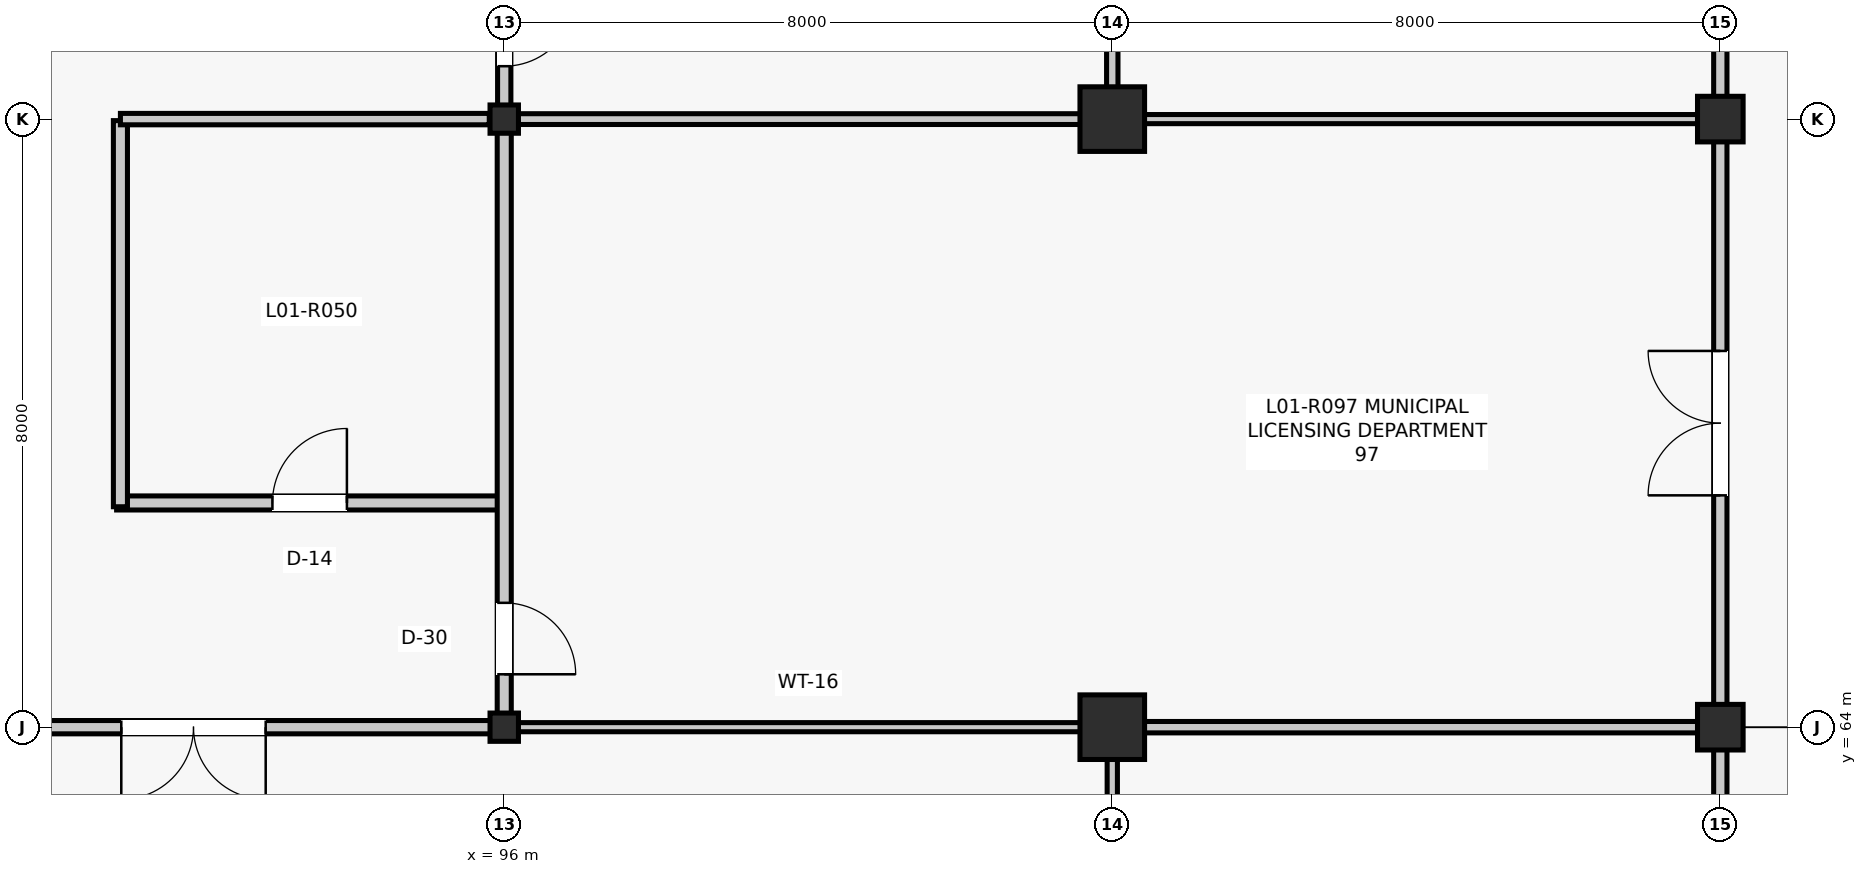
"""IFC4 building model, lengths in metres.
Left out: names, types, materials, properties, quantities, classifications, styles, units other than length and angle.
Written with IfcOpenShell. Run it as: python <this file> out.ifc"""

import sys

from ifc_helpers import new_model, si_unit, direction, frame, frame_2d, origin, origin_2d, place, context, subcontext, project, spatial, rectangle, i_section, extrude, element, fill, save


model = new_model("IFC4")
c1 = context("Model", 3, precision=1e-05, world=origin(), true_north=direction((0.0, 1.0)))
c2 = subcontext(c1, "Body", "Model", "MODEL_VIEW")
j1 = project(units=[si_unit("LENGTHUNIT", "METRE"), si_unit("PLANEANGLEUNIT", "RADIAN")], contexts=[c1])
p1 = place(None, origin())
s1 = spatial("IfcSite", under=j1, at=p1, CompositionType="ELEMENT")
p2 = place(p1, origin())
s2 = spatial("IfcBuilding", under=s1, at=p2, CompositionType="ELEMENT")
p3 = place(p2, frame((0.0, 0.0, 5.28)))
s3 = spatial("IfcBuildingStorey", under=s2, at=p3, CompositionType="ELEMENT", Elevation=5.28)
for number, where, z_axis, x_axis in (
    (1, (96.0, 64.0, 0.0), (0.0, 0.0, 1.0), (1.0, 0.0, 0.0)),
    (2, (96.0, 72.0, 0.0), (0.0, 0.0, 1.0), (1.0, 0.0, 0.0)),
):
    element("IfcColumn", number, at=place(p3, frame(where, z_axis=z_axis, x_axis=x_axis)), inside=s3, PredefinedType="COLUMN", context=c2, shape_type="SweptSolid", body=[
        extrude(i_section(OverallWidth=0.374, OverallDepth=0.372, WebThickness=0.016, FlangeThickness=0.026, FilletRadius=0.015, at=origin_2d()), origin(), (0.0, 0.0, 1.0), 4.62),
    ])
for number, where, z_axis, x_axis in (
    (3, (104.0, 64.0, 0.0), (0.0, 0.0, 1.0), (1.0, 0.0, 0.0)),
    (4, (104.0, 72.0, 0.0), (0.0, 0.0, 1.0), (1.0, 0.0, 0.0)),
):
    element("IfcColumn", number, at=place(p3, frame(where, z_axis=z_axis, x_axis=x_axis)), inside=s3, PredefinedType="COLUMN", context=c2, shape_type="SweptSolid", body=[
        extrude(rectangle(XDim=0.85, YDim=0.85, at=origin_2d()), origin(), (0.0, 0.0, 1.0), 4.62),
    ])
for number, where, z_axis, x_axis in (
    (5, (112.0, 64.0, 0.0), (0.0, 0.0, 1.0), (1.0, 0.0, 0.0)),
    (6, (112.0, 72.0, 0.0), (0.0, 0.0, 1.0), (1.0, 0.0, 0.0)),
):
    element("IfcColumn", number, at=place(p3, frame(where, z_axis=z_axis, x_axis=x_axis)), inside=s3, PredefinedType="COLUMN", context=c2, shape_type="SweptSolid", body=[
        extrude(rectangle(XDim=0.6, YDim=0.6, at=origin_2d()), origin(), (0.0, 0.0, 1.0), 4.62),
    ])
p4 = place(p3, frame((90.9, 66.95, 0.0), z_axis=(0.0, 0.0, 1.0), x_axis=(1.0, 0.0, 0.0)))
e7 = element("IfcWall", 7, at=p4, inside=s3, PredefinedType="PARTITIONING", context=c2, shape_type="SweptSolid", body=[
    extrude(rectangle(XDim=5.08, YDim=0.185, at=frame_2d((2.54, 0.0))), origin(), (0.0, 0.0, 1.0), 3.787),
])
p5 = place(p4, frame((2.05, 0.0, 0.0)))
e8 = element("IfcOpeningElement", 8, at=p5, cuts=e7, PredefinedType="OPENING", context=c2, shape_type="SweptSolid", body=[
    extrude(rectangle(XDim=0.98, YDim=2.15, at=frame_2d((0.49, 1.075))), frame((0.0, 0.103, 0.0), z_axis=(0.0, -1.0, 0.0), x_axis=(1.0, 0.0, 0.0)), (0.0, 0.0, 1.0), 0.205),
])
p6 = place(p3, frame((90.95, 66.9, 0.0), z_axis=(0.0, 0.0, 1.0), x_axis=(0.0, 1.0, 0.0)))
e9 = element("IfcWall", 9, at=p6, inside=s3, PredefinedType="PARTITIONING", context=c2, shape_type="SweptSolid", body=[
    extrude(rectangle(XDim=5.08, YDim=0.185, at=frame_2d((2.54, 0.0))), origin(), (0.0, 0.0, 1.0), 3.397),
])
p7 = place(p3, frame((90.95, 72.0, 0.0), z_axis=(0.0, 0.0, 1.0), x_axis=(1.0, 0.0, 0.0)))
e10 = element("IfcWall", 10, at=p7, inside=s3, PredefinedType="PARTITIONING", context=c2, shape_type="SweptSolid", body=[
    extrude(rectangle(XDim=4.853, YDim=0.15, at=frame_2d((2.427, 0.0))), origin(), (0.0, 0.0, 1.0), 3.397),
])
p8 = place(p3, frame((88.0, 64.0, 0.0), z_axis=(0.0, 0.0, 1.0), x_axis=(1.0, 0.0, 0.0)))
e11 = element("IfcWall", 11, at=p8, inside=s3, PredefinedType="PARTITIONING", context=c2, shape_type="SweptSolid", body=[
    extrude(rectangle(XDim=7.823, YDim=0.175, at=frame_2d((3.912, 0.0))), origin(), (0.0, 0.0, 1.0), 3.562),
])
p9 = place(p8, frame((2.961, 0.0, 0.0)))
e12 = element("IfcOpeningElement", 12, at=p9, cuts=e11, PredefinedType="OPENING", context=c2, shape_type="SweptSolid", body=[
    extrude(rectangle(XDim=1.9, YDim=2.38, at=frame_2d((0.95, 1.19))), frame((0.0, 0.097, 0.0), z_axis=(0.0, -1.0, 0.0), x_axis=(1.0, 0.0, 0.0)), (0.0, 0.0, 1.0), 0.195),
])
p10 = place(p3, frame((96.0, 64.176, 0.0), z_axis=(0.0, 0.0, 1.0), x_axis=(0.0, 1.0, 0.0)))
e13 = element("IfcWall", 13, at=p10, inside=s3, PredefinedType="PARTITIONING", context=c2, shape_type="SweptSolid", body=[
    extrude(rectangle(XDim=7.648, YDim=0.185, at=frame_2d((3.824, 0.0))), origin(), (0.0, 0.0, 1.0), 3.787),
])
p11 = place(p10, frame((0.52, 0.0, 0.0)))
e14 = element("IfcOpeningElement", 14, at=p11, cuts=e13, PredefinedType="OPENING", context=c2, shape_type="SweptSolid", body=[
    extrude(rectangle(XDim=0.94, YDim=2.12, at=frame_2d((0.47, 1.06))), frame((0.0, 0.103, 0.0), z_axis=(0.0, -1.0, 0.0), x_axis=(1.0, 0.0, 0.0)), (0.0, 0.0, 1.0), 0.205),
])
p12 = place(p3, frame((96.0, 72.176, 0.0), z_axis=(0.0, 0.0, 1.0), x_axis=(0.0, 1.0, 0.0)))
e15 = element("IfcWall", 15, at=p12, inside=s3, PredefinedType="PARTITIONING", context=c2, shape_type="SweptSolid", body=[
    extrude(rectangle(XDim=7.648, YDim=0.175, at=frame_2d((3.824, 0.0))), origin(), (0.0, 0.0, 1.0), 3.857),
])
p13 = place(p12, frame((0.52, 0.0, 0.0)))
e16 = element("IfcOpeningElement", 16, at=p13, cuts=e15, PredefinedType="OPENING", context=c2, shape_type="SweptSolid", body=[
    extrude(rectangle(XDim=0.94, YDim=2.12, at=frame_2d((0.47, 1.06))), frame((0.0, 0.097, 0.0), z_axis=(0.0, -1.0, 0.0), x_axis=(1.0, 0.0, 0.0)), (0.0, 0.0, 1.0), 0.195),
])
p14 = place(p3, frame((104.0, 56.415, 0.0), z_axis=(0.0, 0.0, 1.0), x_axis=(0.0, 1.0, 0.0)))
e17 = element("IfcWall", 17, at=p14, inside=s3, PredefinedType="PARTITIONING", context=c2, shape_type="SweptSolid", body=[
    extrude(rectangle(XDim=7.17, YDim=0.135, at=frame_2d((3.585, 0.0))), origin(), (0.0, 0.0, 1.0), 3.787),
])
p15 = place(p3, frame((96.177, 64.0, 0.0), z_axis=(0.0, 0.0, 1.0), x_axis=(1.0, 0.0, 0.0)))
e18 = element("IfcWall", 18, at=p15, inside=s3, PredefinedType="PARTITIONING", context=c2, shape_type="SweptSolid", body=[
    extrude(rectangle(XDim=7.408, YDim=0.12, at=frame_2d((3.704, 0.0))), origin(), (0.0, 0.0, 1.0), 3.712),
])
p16 = place(p3, frame((96.177, 72.0, 0.0), z_axis=(0.0, 0.0, 1.0), x_axis=(1.0, 0.0, 0.0)))
e19 = element("IfcWall", 19, at=p16, inside=s3, PredefinedType="PARTITIONING", context=c2, shape_type="SweptSolid", body=[
    extrude(rectangle(XDim=7.408, YDim=0.142, at=frame_2d((3.704, 0.0))), origin(), (0.0, 0.0, 1.0), 3.787),
])
p17 = place(p3, frame((104.0, 72.415, 0.0), z_axis=(0.0, 0.0, 1.0), x_axis=(0.0, 1.0, 0.0)))
e20 = element("IfcWall", 20, at=p17, inside=s3, PredefinedType="PARTITIONING", context=c2, shape_type="SweptSolid", body=[
    extrude(rectangle(XDim=7.17, YDim=0.15, at=frame_2d((3.585, 0.0))), origin(), (0.0, 0.0, 1.0), 3.781),
])
p18 = place(p3, frame((112.0, 56.39, 0.0), z_axis=(0.0, 0.0, 1.0), x_axis=(0.0, 1.0, 0.0)))
e21 = element("IfcWall", 21, at=p18, inside=s3, PredefinedType="PARTITIONING", context=c2, shape_type="SweptSolid", body=[
    extrude(rectangle(XDim=7.32, YDim=0.175, at=frame_2d((3.66, 0.0))), origin(), (0.0, 0.0, 1.0), 3.857),
])
p19 = place(p18, frame((3.1, 0.0, 0.0)))
e22 = element("IfcOpeningElement", 22, at=p19, cuts=e21, PredefinedType="OPENING", context=c2, shape_type="SweptSolid", body=[
    extrude(rectangle(XDim=1.12, YDim=2.22, at=frame_2d((0.56, 1.11))), frame((0.0, 0.097, 0.0), z_axis=(0.0, -1.0, 0.0), x_axis=(1.0, 0.0, 0.0)), (0.0, 0.0, 1.0), 0.195),
])
p20 = place(p3, frame((104.415, 64.0, 0.0), z_axis=(0.0, 0.0, 1.0), x_axis=(1.0, 0.0, 0.0)))
e23 = element("IfcWall", 23, at=p20, inside=s3, PredefinedType="PARTITIONING", context=c2, shape_type="SweptSolid", body=[
    extrude(rectangle(XDim=7.295, YDim=0.15, at=frame_2d((3.647, 0.0))), origin(), (0.0, 0.0, 1.0), 3.787),
])
p21 = place(p3, frame((112.0, 64.29, 0.0), z_axis=(0.0, 0.0, 1.0), x_axis=(0.0, 1.0, 0.0)))
e24 = element("IfcWall", 24, at=p21, inside=s3, PredefinedType="PARTITIONING", context=c2, shape_type="SweptSolid", body=[
    extrude(rectangle(XDim=7.42, YDim=0.175, at=frame_2d((3.71, 0.0))), origin(), (0.0, 0.0, 1.0), 3.781),
])
p22 = place(p21, frame((2.76, 0.0, 0.0)))
e25 = element("IfcOpeningElement", 25, at=p22, cuts=e24, PredefinedType="OPENING", context=c2, shape_type="SweptSolid", body=[
    extrude(rectangle(XDim=1.9, YDim=2.38, at=frame_2d((0.95, 1.19))), frame((0.0, 0.097, 0.0), z_axis=(0.0, -1.0, 0.0), x_axis=(1.0, 0.0, 0.0)), (0.0, 0.0, 1.0), 0.195),
])
p23 = place(p3, frame((104.415, 72.0, 0.0), z_axis=(0.0, 0.0, 1.0), x_axis=(1.0, 0.0, 0.0)))
e26 = element("IfcWall", 26, at=p23, inside=s3, PredefinedType="PARTITIONING", context=c2, shape_type="SweptSolid", body=[
    extrude(rectangle(XDim=7.295, YDim=0.12, at=frame_2d((3.647, 0.0))), origin(), (0.0, 0.0, 1.0), 3.771),
])
p24 = place(p3, frame((112.0, 72.29, 0.0), z_axis=(0.0, 0.0, 1.0), x_axis=(0.0, 1.0, 0.0)))
e27 = element("IfcWall", 27, at=p24, inside=s3, PredefinedType="PARTITIONING", context=c2, shape_type="SweptSolid", body=[
    extrude(rectangle(XDim=7.42, YDim=0.175, at=frame_2d((3.71, 0.0))), origin(), (0.0, 0.0, 1.0), 3.851),
])
p25 = place(p24, frame((1.355, 0.0, 0.0)))
e28 = element("IfcOpeningElement", 28, at=p25, cuts=e27, PredefinedType="OPENING", context=c2, shape_type="SweptSolid", body=[
    extrude(rectangle(XDim=1.0, YDim=2.15, at=frame_2d((0.5, 1.075))), frame((0.0, 0.097, 0.0), z_axis=(0.0, -1.0, 0.0), x_axis=(1.0, 0.0, 0.0)), (0.0, 0.0, 1.0), 0.195),
])
p26 = place(p24, frame((5.436, 0.0, 0.0)))
e29 = element("IfcOpeningElement", 29, at=p26, cuts=e27, PredefinedType="OPENING", context=c2, shape_type="SweptSolid", body=[
    extrude(rectangle(XDim=1.0, YDim=2.15, at=frame_2d((0.5, 1.075))), frame((0.0, 0.097, 0.0), z_axis=(0.0, -1.0, 0.0), x_axis=(1.0, 0.0, 0.0)), (0.0, 0.0, 1.0), 0.195),
])
p27 = place(p5, origin())
e30 = element("IfcDoor", 30, at=p27, inside=s3, OperationType="SINGLE_SWING_RIGHT", PredefinedType="DOOR", context=c2, shape_type="SweptSolid", body=[
    extrude(rectangle(XDim=0.98, YDim=2.15, at=frame_2d((0.49, 1.075))), frame((0.0, 0.025, 0.0), z_axis=(0.0, -1.0, 0.0), x_axis=(1.0, 0.0, 0.0)), (0.0, 0.0, 1.0), 0.05),
])
fill(e8, e30)
p28 = place(p9, frame((1.9, 0.0, 0.0), z_axis=(0.0, 0.0, 1.0), x_axis=(-1.0, 0.0, 0.0)))
e31 = element("IfcDoor", 31, at=p28, inside=s3, OperationType="DOUBLE_DOOR_SINGLE_SWING", PredefinedType="DOOR", context=c2, shape_type="SweptSolid", body=[
    extrude(rectangle(XDim=1.9, YDim=2.38, at=frame_2d((0.95, 1.19))), frame((0.0, 0.025, 0.0), z_axis=(0.0, -1.0, 0.0), x_axis=(1.0, 0.0, 0.0)), (0.0, 0.0, 1.0), 0.05),
])
fill(e12, e31)
p29 = place(p11, frame((0.94, 0.0, 0.0), z_axis=(0.0, 0.0, 1.0), x_axis=(-1.0, 0.0, 0.0)))
e32 = element("IfcDoor", 32, at=p29, inside=s3, OperationType="SINGLE_SWING_LEFT", PredefinedType="DOOR", context=c2, shape_type="SweptSolid", body=[
    extrude(rectangle(XDim=0.94, YDim=2.12, at=frame_2d((0.47, 1.06))), frame((0.0, 0.025, 0.0), z_axis=(0.0, -1.0, 0.0), x_axis=(1.0, 0.0, 0.0)), (0.0, 0.0, 1.0), 0.05),
])
fill(e14, e32)
p30 = place(p13, frame((0.94, 0.0, 0.0), z_axis=(0.0, 0.0, 1.0), x_axis=(-1.0, 0.0, 0.0)))
e33 = element("IfcDoor", 33, at=p30, inside=s3, OperationType="SINGLE_SWING_RIGHT", PredefinedType="DOOR", context=c2, shape_type="SweptSolid", body=[
    extrude(rectangle(XDim=0.94, YDim=2.12, at=frame_2d((0.47, 1.06))), frame((0.0, 0.025, 0.0), z_axis=(0.0, -1.0, 0.0), x_axis=(1.0, 0.0, 0.0)), (0.0, 0.0, 1.0), 0.05),
])
fill(e16, e33)
p31 = place(p22, origin())
e34 = element("IfcDoor", 34, at=p31, inside=s3, OperationType="DOUBLE_DOOR_SINGLE_SWING", PredefinedType="DOOR", context=c2, shape_type="SweptSolid", body=[
    extrude(rectangle(XDim=1.9, YDim=2.38, at=frame_2d((0.95, 1.19))), frame((0.0, 0.025, 0.0), z_axis=(0.0, -1.0, 0.0), x_axis=(1.0, 0.0, 0.0)), (0.0, 0.0, 1.0), 0.05),
])
fill(e25, e34)
save(model, sys.argv[1])
